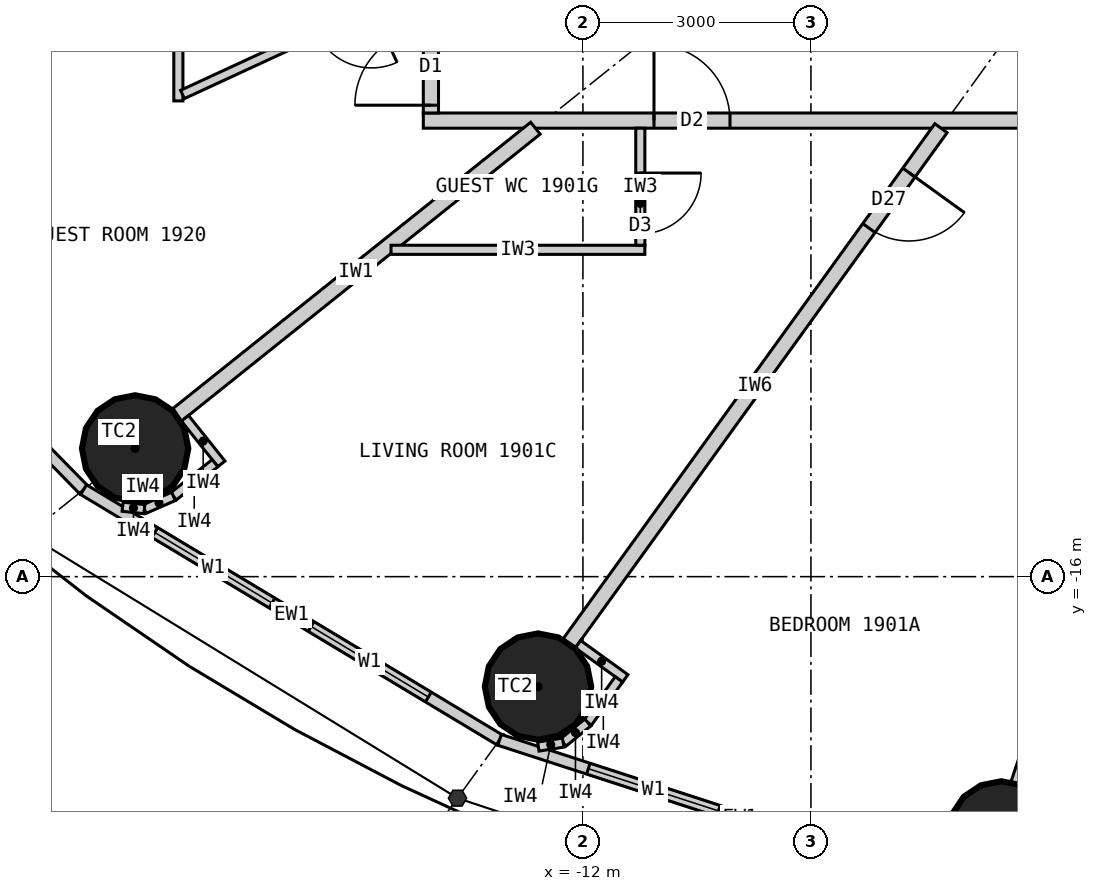
"""IFC4 building model, lengths in metres.
Left out: names, types, materials, properties, quantities, classifications, styles, units other than length and angle.
Written with IfcOpenShell. Run it as: python <this file> out.ifc"""

import sys

from ifc_helpers import new_model, si_unit, direction, frame, frame_2d, origin, origin_2d, place, context, subcontext, project, spatial, rectangle, circle, extrude, element, fill, save


model = new_model("IFC4")
c1 = context("Model", 3, precision=1e-05, world=origin(), true_north=direction((0.0, 1.0)))
c2 = subcontext(c1, "Body", "Model", "MODEL_VIEW")
j1 = project(units=[si_unit("LENGTHUNIT", "METRE"), si_unit("PLANEANGLEUNIT", "RADIAN")], contexts=[c1])
p1 = place(None, origin())
s1 = spatial("IfcSite", under=j1, at=p1, CompositionType="ELEMENT")
p2 = place(p1, origin())
s2 = spatial("IfcBuilding", under=s1, at=p2, CompositionType="ELEMENT")
p3 = place(p2, frame((0.0, 0.0, 77.1)))
s3 = spatial("IfcBuildingStorey", under=s2, at=p3, CompositionType="ELEMENT", Elevation=77.1)
for number, where, z_axis, x_axis in (
    (1, (-17.892, -14.313, 0.0), (0.0, 0.0, 1.0), (1.0, 0.0, 0.0)),
    (2, (-12.591, -17.447, 0.0), (0.0, 0.0, 1.0), (1.0, 0.0, 0.0)),
    (3, (-6.495, -19.391, 0.0), (0.0, 0.0, 1.0), (1.0, 0.0, 0.0)),
):
    element("IfcColumn", number, at=place(p3, frame(where, z_axis=z_axis, x_axis=x_axis)), inside=s3, PredefinedType="COLUMN", context=c2, shape_type="SweptSolid", body=[
        extrude(circle(Radius=0.7, at=origin_2d()), origin(), (0.0, 0.0, 1.0), 3.3),
    ])
p4 = place(p3, frame((-22.803, -10.532, 0.0), z_axis=(0.0, 0.0, 1.0), x_axis=(0.699602905915, -0.714531856557, 0.0)))
e4 = element("IfcWall", 4, at=p4, inside=s3, PredefinedType="ELEMENTEDWALL", context=c2, shape_type="SweptSolid", body=[
    extrude(rectangle(XDim=6.051, YDim=0.15, at=frame_2d((3.025, 0.0))), origin(), (0.0, 0.0, 1.0), 3.12),
])
p5 = place(p4, frame((0.926, 0.0, 0.9)))
e5 = element("IfcOpeningElement", 5, at=p5, cuts=e4, PredefinedType="OPENING", context=c2, shape_type="SweptSolid", body=[
    extrude(rectangle(XDim=1.8, YDim=1.9, at=frame_2d((0.9, 0.95))), frame((0.0, 0.085, 0.0), z_axis=(0.0, -1.0, 0.0), x_axis=(1.0, 0.0, 0.0)), (0.0, 0.0, 1.0), 0.17),
])
p6 = place(p4, frame((3.325, 0.0, 0.9)))
e6 = element("IfcOpeningElement", 6, at=p6, cuts=e4, PredefinedType="OPENING", context=c2, shape_type="SweptSolid", body=[
    extrude(rectangle(XDim=1.8, YDim=1.9, at=frame_2d((0.9, 0.95))), frame((0.0, 0.085, 0.0), z_axis=(0.0, -1.0, 0.0), x_axis=(1.0, 0.0, 0.0)), (0.0, 0.0, 1.0), 0.17),
])
p7 = place(p3, frame((-18.57, -14.856, 0.0), z_axis=(0.0, 0.0, 1.0), x_axis=(0.856983180864, -0.515344377787, 0.0)))
e7 = element("IfcWall", 7, at=p7, inside=s3, PredefinedType="ELEMENTEDWALL", context=c2, shape_type="SweptSolid", body=[
    extrude(rectangle(XDim=6.386, YDim=0.15, at=frame_2d((3.193, 0.0))), origin(), (0.0, 0.0, 1.0), 3.12),
])
p8 = place(p7, frame((1.093, 0.0, 0.9)))
e8 = element("IfcOpeningElement", 8, at=p8, cuts=e7, PredefinedType="OPENING", context=c2, shape_type="SweptSolid", body=[
    extrude(rectangle(XDim=1.8, YDim=1.9, at=frame_2d((0.9, 0.95))), frame((0.0, 0.085, 0.0), z_axis=(0.0, -1.0, 0.0), x_axis=(1.0, 0.0, 0.0)), (0.0, 0.0, 1.0), 0.17),
])
p9 = place(p7, frame((3.493, 0.0, 0.9)))
e9 = element("IfcOpeningElement", 9, at=p9, cuts=e7, PredefinedType="OPENING", context=c2, shape_type="SweptSolid", body=[
    extrude(rectangle(XDim=1.8, YDim=1.9, at=frame_2d((0.9, 0.95))), frame((0.0, 0.085, 0.0), z_axis=(0.0, -1.0, 0.0), x_axis=(1.0, 0.0, 0.0)), (0.0, 0.0, 1.0), 0.17),
])
p10 = place(p3, frame((-13.096, -18.147, 0.0), z_axis=(0.0, 0.0, 1.0), x_axis=(0.951137534625, -0.308767534285, 0.0)))
e10 = element("IfcWall", 10, at=p10, inside=s3, PredefinedType="ELEMENTEDWALL", context=c2, shape_type="SweptSolid", body=[
    extrude(rectangle(XDim=6.655, YDim=0.15, at=frame_2d((3.328, 0.0))), origin(), (0.0, 0.0, 1.0), 3.12),
])
p11 = place(p10, frame((1.228, 0.0, 0.9)))
e11 = element("IfcOpeningElement", 11, at=p11, cuts=e10, PredefinedType="OPENING", context=c2, shape_type="SweptSolid", body=[
    extrude(rectangle(XDim=1.8, YDim=1.9, at=frame_2d((0.9, 0.95))), frame((0.0, 0.085, 0.0), z_axis=(0.0, -1.0, 0.0), x_axis=(1.0, 0.0, 0.0)), (0.0, 0.0, 1.0), 0.17),
])
p12 = place(p10, frame((3.628, 0.0, 0.9)))
e12 = element("IfcOpeningElement", 12, at=p12, cuts=e10, PredefinedType="OPENING", context=c2, shape_type="SweptSolid", body=[
    extrude(rectangle(XDim=1.8, YDim=1.9, at=frame_2d((0.9, 0.95))), frame((0.0, 0.085, 0.0), z_axis=(0.0, -1.0, 0.0), x_axis=(1.0, 0.0, 0.0)), (0.0, 0.0, 1.0), 0.17),
])
p13 = place(p3, frame((14.1, -10.0, 0.0), z_axis=(0.0, 0.0, 1.0), x_axis=(-1.0, 0.0, 0.0)))
e13 = element("IfcWall", 13, at=p13, inside=s3, PredefinedType="PARTITIONING", context=c2, shape_type="SweptSolid", body=[
    extrude(rectangle(XDim=28.2, YDim=0.2, at=frame_2d((14.1, 0.0))), origin(), (0.0, 0.0, 1.0), 3.12),
])
p14 = place(p13, frame((24.165, 0.0, 0.0)))
e14 = element("IfcOpeningElement", 14, at=p14, cuts=e13, PredefinedType="OPENING", context=c2, shape_type="SweptSolid", body=[
    extrude(rectangle(XDim=1.0, YDim=2.2, at=frame_2d((0.5, 1.1))), frame((0.0, 0.11, 0.0), z_axis=(0.0, -1.0, 0.0), x_axis=(1.0, 0.0, 0.0)), (0.0, 0.0, 1.0), 0.22),
])
p15 = place(p13, frame((14.923, 0.0, 0.0)))
e15 = element("IfcOpeningElement", 15, at=p15, cuts=e13, PredefinedType="OPENING", context=c2, shape_type="SweptSolid", body=[
    extrude(rectangle(XDim=1.0, YDim=2.2, at=frame_2d((0.5, 1.1))), frame((0.0, 0.11, 0.0), z_axis=(0.0, -1.0, 0.0), x_axis=(1.0, 0.0, 0.0)), (0.0, 0.0, 1.0), 0.22),
])
p16 = place(p13, frame((3.035, 0.0, 0.0)))
e16 = element("IfcOpeningElement", 16, at=p16, cuts=e13, PredefinedType="OPENING", context=c2, shape_type="SweptSolid", body=[
    extrude(rectangle(XDim=1.0, YDim=2.2, at=frame_2d((0.5, 1.1))), frame((0.0, 0.11, 0.0), z_axis=(0.0, -1.0, 0.0), x_axis=(1.0, 0.0, 0.0)), (0.0, 0.0, 1.0), 0.22),
])
p17 = place(p3, frame((-14.1, -6.512, 0.0), z_axis=(0.0, 0.0, 1.0), x_axis=(-0.907832871056, -0.419332181247, 0.0)))
e17 = element("IfcWall", 17, at=p17, inside=s3, PredefinedType="PARTITIONING", context=c2, shape_type="SweptSolid", body=[
    extrude(rectangle(XDim=8.023, YDim=0.2, at=frame_2d((4.011, 0.0))), origin(), (0.0, 0.0, 1.0), 2.32),
])
p18 = place(p3, frame((-12.625, -10.1, 0.0), z_axis=(0.0, 0.0, 1.0), x_axis=(-0.780892451574, -0.624665493744, 0.0)))
e18 = element("IfcWall", 18, at=p18, inside=s3, PredefinedType="PARTITIONING", context=c2, shape_type="SweptSolid", body=[
    extrude(rectangle(XDim=6.045, YDim=0.2, at=frame_2d((3.022, 0.0))), origin(), (0.0, 0.0, 1.0), 2.32),
])
p19 = place(p3, frame((-7.289, -10.1, 0.0), z_axis=(0.0, 0.0, 1.0), x_axis=(-0.585198353053, -0.810890182197, 0.0)))
e19 = element("IfcWall", 19, at=p19, inside=s3, PredefinedType="PARTITIONING", context=c2, shape_type="SweptSolid", body=[
    extrude(rectangle(XDim=8.36, YDim=0.2, at=frame_2d((4.18, 0.0))), origin(), (0.0, 0.0, 1.0), 2.32),
])
p20 = place(p19, frame((0.72, 0.0, 0.0)))
e20 = element("IfcOpeningElement", 20, at=p20, cuts=e19, PredefinedType="OPENING", context=c2, shape_type="SweptSolid", body=[
    extrude(rectangle(XDim=0.9, YDim=2.1, at=frame_2d((0.45, 1.05))), frame((0.0, 0.11, 0.0), z_axis=(0.0, -1.0, 0.0), x_axis=(1.0, 0.0, 0.0)), (0.0, 0.0, 1.0), 0.22),
])
p21 = place(p3, frame((-3.383, -10.1, 0.0), z_axis=(0.0, 0.0, 1.0), x_axis=(-0.31759592231, -0.948226149256, 0.0)))
e21 = element("IfcWall", 21, at=p21, inside=s3, PredefinedType="PARTITIONING", context=c2, shape_type="SweptSolid", body=[
    extrude(rectangle(XDim=9.098, YDim=0.2, at=frame_2d((4.549, 0.0))), origin(), (0.0, 0.0, 1.0), 2.32),
])
p22 = place(p3, frame((-14.525, -11.7, 0.0), z_axis=(0.0, 0.0, 1.0), x_axis=(1.0, 0.0, 0.0)))
e22 = element("IfcWall", 22, at=p22, inside=s3, PredefinedType="PARTITIONING", context=c2, shape_type="SweptSolid", body=[
    extrude(rectangle(XDim=3.34, YDim=0.12, at=frame_2d((1.67, 0.0))), origin(), (0.0, 0.0, 1.0), 3.12),
])
p23 = place(p3, frame((-11.245, -10.1, 0.0), z_axis=(0.0, 0.0, 1.0), x_axis=(0.0, -1.0, 0.0)))
e23 = element("IfcWall", 23, at=p23, inside=s3, PredefinedType="PARTITIONING", context=c2, shape_type="SweptSolid", body=[
    extrude(rectangle(XDim=1.54, YDim=0.12, at=frame_2d((0.77, 0.0))), origin(), (0.0, 0.0, 1.0), 3.12),
])
p24 = place(p23, frame((0.59, 0.0, 0.0)))
e24 = element("IfcOpeningElement", 24, at=p24, cuts=e23, PredefinedType="OPENING", context=c2, shape_type="SweptSolid", body=[
    extrude(rectangle(XDim=0.8, YDim=2.1, at=frame_2d((0.4, 1.05))), frame((0.0, 0.07, 0.0), z_axis=(0.0, -1.0, 0.0), x_axis=(1.0, 0.0, 0.0)), (0.0, 0.0, 1.0), 0.14),
])
p25 = place(p3, frame((-17.323, -8.101, 0.0), z_axis=(0.0, 0.0, 1.0), x_axis=(0.0, -1.0, 0.0)))
e25 = element("IfcWall", 25, at=p25, inside=s3, PredefinedType="PARTITIONING", context=c2, shape_type="SweptSolid", body=[
    extrude(rectangle(XDim=1.64, YDim=0.12, at=frame_2d((0.82, 0.0))), origin(), (0.0, 0.0, 1.0), 3.12),
])
p26 = place(p3, frame((-14.1, -8.193, 0.0), z_axis=(0.0, 0.0, 1.0), x_axis=(-0.907836493557, -0.419324338628, 0.0)))
e26 = element("IfcWall", 26, at=p26, inside=s3, PredefinedType="PARTITIONING", context=c2, shape_type="SweptSolid", body=[
    extrude(rectangle(XDim=3.49, YDim=0.12, at=frame_2d((1.745, 0.0))), origin(), (0.0, 0.0, 1.0), 3.12),
])
p27 = place(p26, frame((0.75, 0.0, 0.0)))
e27 = element("IfcOpeningElement", 27, at=p27, cuts=e26, PredefinedType="OPENING", context=c2, shape_type="SweptSolid", body=[
    extrude(rectangle(XDim=0.8, YDim=2.1, at=frame_2d((0.4, 1.05))), frame((0.0, 0.07, 0.0), z_axis=(0.0, -1.0, 0.0), x_axis=(1.0, 0.0, 0.0)), (0.0, 0.0, 1.0), 0.14),
])
p28 = place(p3, frame((-14.0, -4.772, 0.0), z_axis=(0.0, 0.0, 1.0), x_axis=(0.0, -1.0, 0.0)))
e28 = element("IfcWall", 28, at=p28, inside=s3, PredefinedType="PARTITIONING", context=c2, shape_type="SweptSolid", body=[
    extrude(rectangle(XDim=5.127, YDim=0.2, at=frame_2d((2.564, 0.0))), origin(), (0.0, 0.0, 1.0), 3.12),
])
p29 = place(p28, frame((4.025, 0.0, 0.0)))
e29 = element("IfcOpeningElement", 29, at=p29, cuts=e28, PredefinedType="OPENING", context=c2, shape_type="SweptSolid", body=[
    extrude(rectangle(XDim=1.0, YDim=2.2, at=frame_2d((0.5, 1.1))), frame((0.0, 0.11, 0.0), z_axis=(0.0, -1.0, 0.0), x_axis=(1.0, 0.0, 0.0)), (0.0, 0.0, 1.0), 0.22),
])
p30 = place(p3, frame((-17.236, -13.917, 0.0), z_axis=(0.0, 0.0, 1.0), x_axis=(0.624695047554, -0.780868809443, 0.0)))
e30 = element("IfcWall", 30, at=p30, inside=s3, PredefinedType="PARTITIONING", context=c2, shape_type="SweptSolid", body=[
    extrude(rectangle(XDim=0.768, YDim=0.12, at=frame_2d((0.384, 0.0))), origin(), (0.0, 0.0, 1.0), 3.12),
])
p31 = place(p3, frame((-16.841, -14.507, 0.0), z_axis=(0.0, 0.0, 1.0), x_axis=(-0.780902834923, -0.62465251333, 0.0)))
e31 = element("IfcWall", 31, at=p31, inside=s3, PredefinedType="PARTITIONING", context=c2, shape_type="SweptSolid", body=[
    extrude(rectangle(XDim=0.7, YDim=0.12, at=frame_2d((0.35, 0.0))), origin(), (0.0, 0.0, 1.0), 3.12),
])
p32 = place(p3, frame((-17.387, -14.944, 0.0), z_axis=(0.0, 0.0, 1.0), x_axis=(-0.916036698064, -0.401094462441, 0.0)))
e32 = element("IfcWall", 32, at=p32, inside=s3, PredefinedType="PARTITIONING", context=c2, shape_type="SweptSolid", body=[
    extrude(rectangle(XDim=0.418, YDim=0.12, at=frame_2d((0.209, 0.0))), origin(), (0.0, 0.0, 1.0), 3.12),
])
p33 = place(p3, frame((-17.77, -15.112, 0.0), z_axis=(0.0, 0.0, 1.0), x_axis=(-0.993904401174, 0.110245368731, 0.0)))
e33 = element("IfcWall", 33, at=p33, inside=s3, PredefinedType="PARTITIONING", context=c2, shape_type="SweptSolid", body=[
    extrude(rectangle(XDim=0.288, YDim=0.12, at=frame_2d((0.144, 0.0))), origin(), (0.0, 0.0, 1.0), 3.12),
])
p34 = place(p3, frame((-12.065, -16.889, 0.0), z_axis=(0.0, 0.0, 1.0), x_axis=(0.810821798253, -0.585293098778, 0.0)))
e34 = element("IfcWall", 34, at=p34, inside=s3, PredefinedType="PARTITIONING", context=c2, shape_type="SweptSolid", body=[
    extrude(rectangle(XDim=0.768, YDim=0.12, at=frame_2d((0.384, 0.0))), origin(), (0.0, 0.0, 1.0), 3.12),
])
p35 = place(p3, frame((-11.526, -17.351, 0.0), z_axis=(0.0, 0.0, 1.0), x_axis=(-0.585223113993, -0.810872312296, 0.0)))
e35 = element("IfcWall", 35, at=p35, inside=s3, PredefinedType="PARTITIONING", context=c2, shape_type="SweptSolid", body=[
    extrude(rectangle(XDim=0.7, YDim=0.12, at=frame_2d((0.35, 0.0))), origin(), (0.0, 0.0, 1.0), 3.12),
])
p36 = place(p3, frame((-11.936, -17.919, 0.0), z_axis=(0.0, 0.0, 1.0), x_axis=(-0.775023088441, -0.631932917629, 0.0)))
e36 = element("IfcWall", 36, at=p36, inside=s3, PredefinedType="PARTITIONING", context=c2, shape_type="SweptSolid", body=[
    extrude(rectangle(XDim=0.418, YDim=0.12, at=frame_2d((0.209, 0.0))), origin(), (0.0, 0.0, 1.0), 3.12),
])
p37 = place(p3, frame((-12.26, -18.183, 0.0), z_axis=(0.0, 0.0, 1.0), x_axis=(-0.987218661664, -0.159371622511, 0.0)))
e37 = element("IfcWall", 37, at=p37, inside=s3, PredefinedType="PARTITIONING", context=c2, shape_type="SweptSolid", body=[
    extrude(rectangle(XDim=0.331, YDim=0.12, at=frame_2d((0.166, 0.0))), origin(), (0.0, 0.0, 1.0), 3.12),
])
p38 = place(p8, origin())
e38 = element("IfcWindow", 38, at=p38, inside=s3, PartitioningType="SINGLE_PANEL", PredefinedType="WINDOW", context=c2, shape_type="SweptSolid", body=[
    extrude(rectangle(XDim=1.8, YDim=1.9, at=frame_2d((0.9, 0.95))), frame((0.0, 0.03, 0.0), z_axis=(0.0, -1.0, 0.0), x_axis=(1.0, 0.0, 0.0)), (0.0, 0.0, 1.0), 0.06),
])
fill(e8, e38)
p39 = place(p9, origin())
e39 = element("IfcWindow", 39, at=p39, inside=s3, PartitioningType="SINGLE_PANEL", PredefinedType="WINDOW", context=c2, shape_type="SweptSolid", body=[
    extrude(rectangle(XDim=1.8, YDim=1.9, at=frame_2d((0.9, 0.95))), frame((0.0, 0.03, 0.0), z_axis=(0.0, -1.0, 0.0), x_axis=(1.0, 0.0, 0.0)), (0.0, 0.0, 1.0), 0.06),
])
fill(e9, e39)
p40 = place(p11, origin())
e40 = element("IfcWindow", 40, at=p40, inside=s3, PartitioningType="SINGLE_PANEL", PredefinedType="WINDOW", context=c2, shape_type="SweptSolid", body=[
    extrude(rectangle(XDim=1.8, YDim=1.9, at=frame_2d((0.9, 0.95))), frame((0.0, 0.03, 0.0), z_axis=(0.0, -1.0, 0.0), x_axis=(1.0, 0.0, 0.0)), (0.0, 0.0, 1.0), 0.06),
])
fill(e11, e40)
p41 = place(p24, origin())
e41 = element("IfcDoor", 41, at=p41, inside=s3, OperationType="SINGLE_SWING_LEFT", PredefinedType="DOOR", context=c2, shape_type="SweptSolid", body=[
    extrude(rectangle(XDim=0.8, YDim=2.1, at=frame_2d((0.4, 1.05))), frame((0.0, 0.025, 0.0), z_axis=(0.0, -1.0, 0.0), x_axis=(1.0, 0.0, 0.0)), (0.0, 0.0, 1.0), 0.05),
])
fill(e24, e41)
p42 = place(p14, origin())
e42 = element("IfcDoor", 42, at=p42, inside=s3, OperationType="SINGLE_SWING_RIGHT", PredefinedType="DOOR", context=c2, shape_type="SweptSolid", body=[
    extrude(rectangle(XDim=1.0, YDim=2.2, at=frame_2d((0.5, 1.1))), frame((0.0, 0.025, 0.0), z_axis=(0.0, -1.0, 0.0), x_axis=(1.0, 0.0, 0.0)), (0.0, 0.0, 1.0), 0.05),
])
fill(e14, e42)
p43 = place(p20, origin())
e43 = element("IfcDoor", 43, at=p43, inside=s3, OperationType="SINGLE_SWING_LEFT", PredefinedType="DOOR", context=c2, shape_type="SweptSolid", body=[
    extrude(rectangle(XDim=0.9, YDim=2.1, at=frame_2d((0.45, 1.05))), frame((0.0, 0.025, 0.0), z_axis=(0.0, -1.0, 0.0), x_axis=(1.0, 0.0, 0.0)), (0.0, 0.0, 1.0), 0.05),
])
fill(e20, e43)
p44 = place(p29, origin())
e44 = element("IfcDoor", 44, at=p44, inside=s3, OperationType="SINGLE_SWING_RIGHT", PredefinedType="DOOR", context=c2, shape_type="SweptSolid", body=[
    extrude(rectangle(XDim=1.0, YDim=2.2, at=frame_2d((0.5, 1.1))), frame((0.0, 0.025, 0.0), z_axis=(0.0, -1.0, 0.0), x_axis=(1.0, 0.0, 0.0)), (0.0, 0.0, 1.0), 0.05),
])
fill(e29, e44)
save(model, sys.argv[1])
